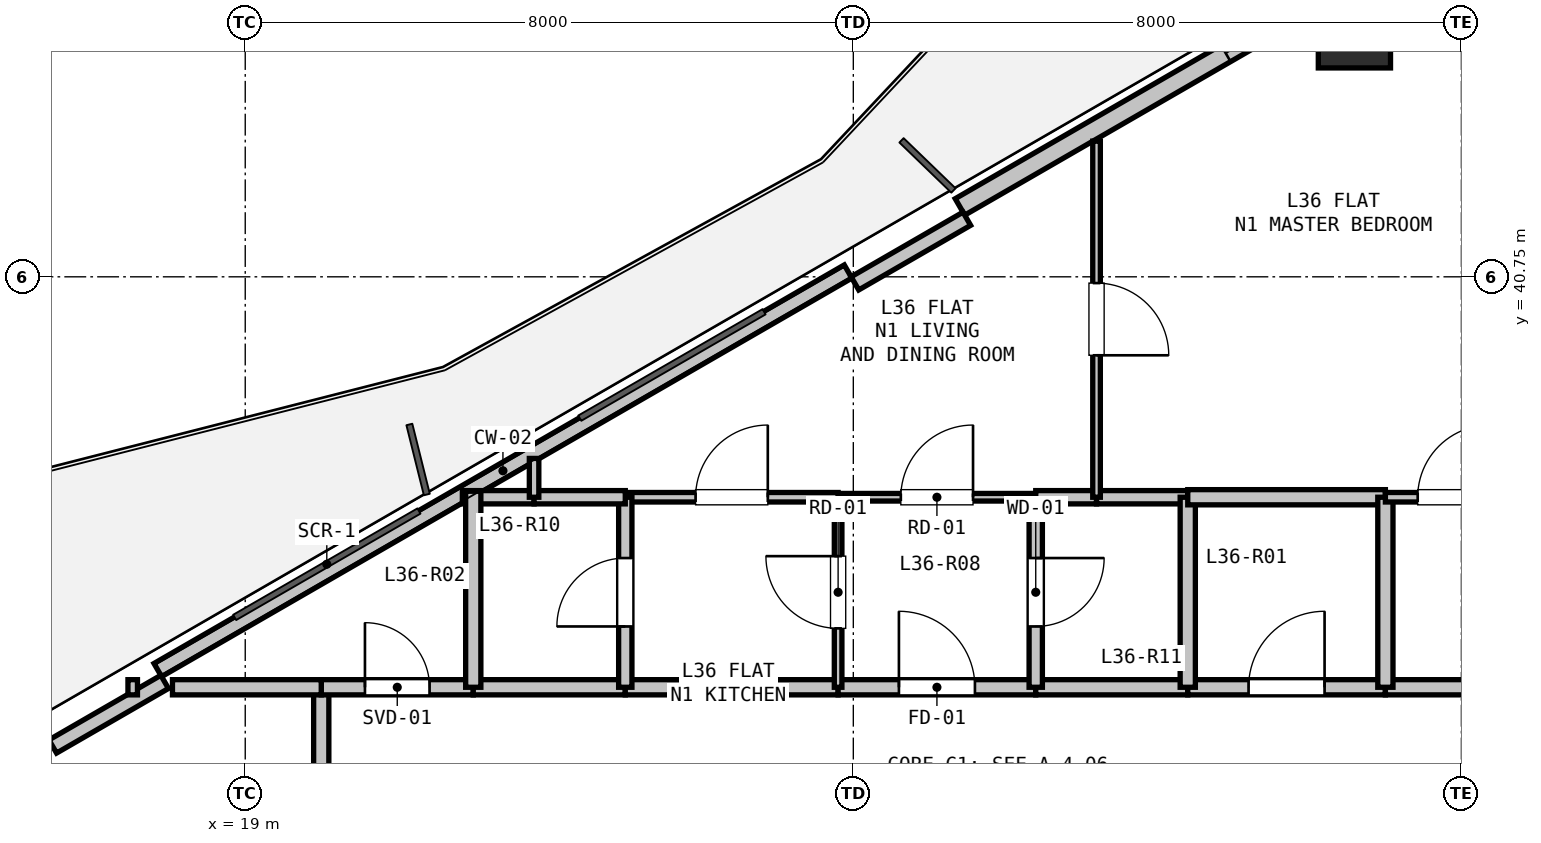
"""IFC4 building model, lengths in metres.
Left out: names, types, materials, properties, quantities, classifications, styles, units other than length and angle.
Written with IfcOpenShell. Run it as: python <this file> out.ifc"""

import sys

from ifc_helpers import new_model, si_unit, direction, frame, frame_2d, origin, origin_2d, place, context, subcontext, project, spatial, rectangle, hollow_rectangle, extrude, element, fill, save


model = new_model("IFC4")
c1 = context("Model", 3, precision=1e-05, world=origin(), true_north=direction((0.0, 1.0)))
c2 = subcontext(c1, "Body", "Model", "MODEL_VIEW")
j1 = project(units=[si_unit("LENGTHUNIT", "METRE"), si_unit("PLANEANGLEUNIT", "RADIAN")], contexts=[c1])
p1 = place(None, origin())
s1 = spatial("IfcSite", under=j1, at=p1, CompositionType="ELEMENT")
p2 = place(p1, origin())
s2 = spatial("IfcBuilding", under=s1, at=p2, CompositionType="ELEMENT")
p3 = place(p2, frame((0.0, 0.0, 131.1)))
s3 = spatial("IfcBuildingStorey", under=s2, at=p3, CompositionType="ELEMENT", Elevation=131.1)
p4 = place(p3, frame((33.593, 43.973, 0.0), z_axis=(0.0, 0.0, 1.0), x_axis=(1.0, 0.0, 0.0)))
e1 = element("IfcColumn", 1, at=p4, inside=s3, PredefinedType="COLUMN", context=c2, shape_type="SweptSolid", body=[
    extrude(hollow_rectangle(XDim=0.95, YDim=0.95, WallThickness=0.028, at=origin_2d()), origin(), (0.0, 0.0, 1.0), 3.3),
])
p5 = place(p3, frame((17.85, 35.577, 0.0), z_axis=(0.0, 0.0, 1.0), x_axis=(0.866026619769, 0.499997893847, 0.0)))
e2 = element("IfcWall", 2, at=p5, inside=s3, PredefinedType="PARAPET", context=c2, shape_type="SweptSolid", body=[
    extrude(rectangle(XDim=10.486, YDim=0.2, at=frame_2d((5.243, 0.0))), origin(), (0.0, 0.0, 1.0), 0.2),
])
p6 = place(p3, frame((28.403, 41.67, 0.0), z_axis=(0.0, 0.0, 1.0), x_axis=(0.86602239209, 0.500005216371, 0.0)))
e3 = element("IfcWall", 3, at=p6, inside=s3, PredefinedType="SOLIDWALL", context=c2, shape_type="SweptSolid", body=[
    extrude(rectangle(XDim=11.186, YDim=0.25, at=frame_2d((5.593, 0.0))), origin(), (0.0, 0.0, 1.0), 2.68),
])
p7 = place(p6, frame((4.039, 0.0, 0.9)))
e4 = element("IfcOpeningElement", 4, at=p7, cuts=e3, PredefinedType="OPENING", context=c2, shape_type="SweptSolid", body=[
    extrude(rectangle(XDim=1.2, YDim=1.4, at=frame_2d((0.6, 0.7))), frame((0.0, 0.135, 0.0), z_axis=(0.0, -1.0, 0.0), x_axis=(1.0, 0.0, 0.0)), (0.0, 0.0, 1.0), 0.27),
])
for number, where, z_axis, x_axis in (
    (5, (16.468, 34.571, 0.0), (0.0, 0.0, 1.0), (0.866, 0.5, 0.0)),
    (6, (27.021, 40.664, 0.0), (0.0, 0.0, 1.0), (0.866, 0.5, 0.0)),
):
    element("IfcWall", number, at=place(p3, frame(where, z_axis=z_axis, x_axis=x_axis)), inside=s3, PredefinedType="PARAPET", context=c2, shape_type="SweptSolid", body=[
        extrude(rectangle(XDim=1.7, YDim=0.2, at=frame_2d((0.85, 0.0))), origin(), (0.0, 0.0, 1.0), 2.68),
    ])
p8 = place(p3, frame((20.0, 32.75, 0.0), z_axis=(0.0, 0.0, 1.0), x_axis=(0.0, 1.0, 0.0)))
e7 = element("IfcWall", 7, at=p8, inside=s3, PredefinedType="PARTITIONING", context=c2, shape_type="SweptSolid", body=[
    extrude(rectangle(XDim=2.6, YDim=0.2, at=frame_2d((1.3, 0.0))), origin(), (0.0, 0.0, 1.0), 2.433),
])
p9 = place(p3, frame((20.0, 35.35, 0.0), z_axis=(0.0, 0.0, 1.0), x_axis=(1.0, 0.0, 0.0)))
e8 = element("IfcWall", 8, at=p9, inside=s3, PredefinedType="PARTITIONING", context=c2, shape_type="SweptSolid", body=[
    extrude(rectangle(XDim=2.0, YDim=0.2, at=frame_2d((1.0, 0.0))), origin(), (0.0, 0.0, 1.0), 3.06),
])
p10 = place(p9, frame((0.575, 0.0, 0.0)))
e9 = element("IfcOpeningElement", 9, at=p10, cuts=e8, PredefinedType="OPENING", context=c2, shape_type="SweptSolid", body=[
    extrude(rectangle(XDim=0.85, YDim=2.1, at=frame_2d((0.425, 1.05))), frame((0.0, 0.11, 0.0), z_axis=(0.0, -1.0, 0.0), x_axis=(1.0, 0.0, 0.0)), (0.0, 0.0, 1.0), 0.22),
])
p11 = place(p3, frame((22.0, 35.35, 0.0), z_axis=(0.0, 0.0, 1.0), x_axis=(1.0, 0.0, 0.0)))
e10 = element("IfcWall", 10, at=p11, inside=s3, PredefinedType="PARTITIONING", context=c2, shape_type="SweptSolid", body=[
    extrude(rectangle(XDim=2.0, YDim=0.2, at=frame_2d((1.0, 0.0))), origin(), (0.0, 0.0, 1.0), 3.06),
])
p12 = place(p3, frame((24.0, 35.35, 0.0), z_axis=(0.0, 0.0, 1.0), x_axis=(1.0, 0.0, 0.0)))
e11 = element("IfcWall", 11, at=p12, inside=s3, PredefinedType="PARTITIONING", context=c2, shape_type="SweptSolid", body=[
    extrude(rectangle(XDim=2.8, YDim=0.2, at=frame_2d((1.4, 0.0))), origin(), (0.0, 0.0, 1.0), 3.06),
])
p13 = place(p3, frame((26.8, 35.35, 0.0), z_axis=(0.0, 0.0, 1.0), x_axis=(1.0, 0.0, 0.0)))
e12 = element("IfcWall", 12, at=p13, inside=s3, PredefinedType="PARTITIONING", context=c2, shape_type="SweptSolid", body=[
    extrude(rectangle(XDim=2.6, YDim=0.2, at=frame_2d((1.3, 0.0))), origin(), (0.0, 0.0, 1.0), 3.06),
])
p14 = place(p13, frame((0.8, 0.0, 0.0)))
e13 = element("IfcOpeningElement", 13, at=p14, cuts=e12, PredefinedType="OPENING", context=c2, shape_type="SweptSolid", body=[
    extrude(rectangle(XDim=1.0, YDim=2.15, at=frame_2d((0.5, 1.075))), frame((0.0, 0.11, 0.0), z_axis=(0.0, -1.0, 0.0), x_axis=(1.0, 0.0, 0.0)), (0.0, 0.0, 1.0), 0.22),
])
p15 = place(p3, frame((29.4, 35.35, 0.0), z_axis=(0.0, 0.0, 1.0), x_axis=(1.0, 0.0, 0.0)))
e14 = element("IfcWall", 14, at=p15, inside=s3, PredefinedType="PARTITIONING", context=c2, shape_type="SweptSolid", body=[
    extrude(rectangle(XDim=2.0, YDim=0.2, at=frame_2d((1.0, 0.0))), origin(), (0.0, 0.0, 1.0), 3.06),
])
p16 = place(p3, frame((31.4, 35.35, 0.0), z_axis=(0.0, 0.0, 1.0), x_axis=(1.0, 0.0, 0.0)))
e15 = element("IfcWall", 15, at=p16, inside=s3, PredefinedType="PARTITIONING", context=c2, shape_type="SweptSolid", body=[
    extrude(rectangle(XDim=2.6, YDim=0.2, at=frame_2d((1.3, 0.0))), origin(), (0.0, 0.0, 1.0), 3.06),
])
p17 = place(p16, frame((0.8, 0.0, 0.0)))
e16 = element("IfcOpeningElement", 16, at=p17, cuts=e15, PredefinedType="OPENING", context=c2, shape_type="SweptSolid", body=[
    extrude(rectangle(XDim=1.0, YDim=2.15, at=frame_2d((0.5, 1.075))), frame((0.0, 0.11, 0.0), z_axis=(0.0, -1.0, 0.0), x_axis=(1.0, 0.0, 0.0)), (0.0, 0.0, 1.0), 0.22),
])
p18 = place(p3, frame((34.0, 35.35, 0.0), z_axis=(0.0, 0.0, 1.0), x_axis=(1.0, 0.0, 0.0)))
e17 = element("IfcWall", 17, at=p18, inside=s3, PredefinedType="PARTITIONING", context=c2, shape_type="SweptSolid", body=[
    extrude(rectangle(XDim=5.2, YDim=0.2, at=frame_2d((2.6, 0.0))), origin(), (0.0, 0.0, 1.0), 2.433),
])
p19 = place(p3, frame((26.8, 37.85, 0.0), z_axis=(0.0, 0.0, 1.0), x_axis=(1.0, 0.0, 0.0)))
e18 = element("IfcWall", 18, at=p19, inside=s3, PredefinedType="PARTITIONING", context=c2, shape_type="SweptSolid", body=[
    extrude(rectangle(XDim=2.6, YDim=0.1, at=frame_2d((1.3, 0.0))), origin(), (0.0, 0.0, 1.0), 3.06),
])
p20 = place(p19, frame((0.825, 0.0, 0.0)))
e19 = element("IfcOpeningElement", 19, at=p20, cuts=e18, PredefinedType="OPENING", context=c2, shape_type="SweptSolid", body=[
    extrude(rectangle(XDim=0.95, YDim=2.1, at=frame_2d((0.475, 1.05))), frame((0.0, 0.06, 0.0), z_axis=(0.0, -1.0, 0.0), x_axis=(1.0, 0.0, 0.0)), (0.0, 0.0, 1.0), 0.12),
])
p21 = place(p3, frame((29.4, 37.85, 0.0), z_axis=(0.0, 0.0, 1.0), x_axis=(0.0, -1.0, 0.0)))
e20 = element("IfcWall", 20, at=p21, inside=s3, PredefinedType="PLUMBINGWALL", context=c2, shape_type="SweptSolid", body=[
    extrude(rectangle(XDim=2.5, YDim=0.175, at=frame_2d((1.25, 0.0))), origin(), (0.0, 0.0, 1.0), 3.06),
])
p22 = place(p21, frame((0.8, 0.0, 0.0)))
e21 = element("IfcOpeningElement", 21, at=p22, cuts=e20, PredefinedType="OPENING", context=c2, shape_type="SweptSolid", body=[
    extrude(rectangle(XDim=0.9, YDim=2.1, at=frame_2d((0.45, 1.05))), frame((0.0, 0.097, 0.0), z_axis=(0.0, -1.0, 0.0), x_axis=(1.0, 0.0, 0.0)), (0.0, 0.0, 1.0), 0.195),
])
p23 = place(p3, frame((26.8, 35.35, 0.0), z_axis=(0.0, 0.0, 1.0), x_axis=(0.0, 1.0, 0.0)))
e22 = element("IfcWall", 22, at=p23, inside=s3, PredefinedType="PARTITIONING", context=c2, shape_type="SweptSolid", body=[
    extrude(rectangle(XDim=2.5, YDim=0.1, at=frame_2d((1.25, 0.0))), origin(), (0.0, 0.0, 1.0), 3.06),
])
p24 = place(p23, frame((0.775, 0.0, 0.0)))
e23 = element("IfcOpeningElement", 23, at=p24, cuts=e22, PredefinedType="OPENING", context=c2, shape_type="SweptSolid", body=[
    extrude(rectangle(XDim=0.95, YDim=2.1, at=frame_2d((0.475, 1.05))), frame((0.0, 0.06, 0.0), z_axis=(0.0, -1.0, 0.0), x_axis=(1.0, 0.0, 0.0)), (0.0, 0.0, 1.0), 0.12),
])
p25 = place(p3, frame((24.0, 37.85, 0.0), z_axis=(0.0, 0.0, 1.0), x_axis=(1.0, 0.0, 0.0)))
e24 = element("IfcWall", 24, at=p25, inside=s3, PredefinedType="PARTITIONING", context=c2, shape_type="SweptSolid", body=[
    extrude(rectangle(XDim=2.8, YDim=0.125, at=frame_2d((1.4, 0.0))), origin(), (0.0, 0.0, 1.0), 3.06),
])
p26 = place(p25, frame((0.925, 0.0, 0.0)))
e25 = element("IfcOpeningElement", 25, at=p26, cuts=e24, PredefinedType="OPENING", context=c2, shape_type="SweptSolid", body=[
    extrude(rectangle(XDim=0.95, YDim=2.1, at=frame_2d((0.475, 1.05))), frame((0.0, 0.073, 0.0), z_axis=(0.0, -1.0, 0.0), x_axis=(1.0, 0.0, 0.0)), (0.0, 0.0, 1.0), 0.145),
])
p27 = place(p3, frame((24.0, 35.35, 0.0), z_axis=(0.0, 0.0, 1.0), x_axis=(0.0, 1.0, 0.0)))
e26 = element("IfcWall", 26, at=p27, inside=s3, PredefinedType="PLUMBINGWALL", context=c2, shape_type="SweptSolid", body=[
    extrude(rectangle(XDim=2.5, YDim=0.175, at=frame_2d((1.25, 0.0))), origin(), (0.0, 0.0, 1.0), 3.06),
])
p28 = place(p27, frame((0.8, 0.0, 0.0)))
e27 = element("IfcOpeningElement", 27, at=p28, cuts=e26, PredefinedType="OPENING", context=c2, shape_type="SweptSolid", body=[
    extrude(rectangle(XDim=0.9, YDim=2.1, at=frame_2d((0.45, 1.05))), frame((0.0, 0.097, 0.0), z_axis=(0.0, -1.0, 0.0), x_axis=(1.0, 0.0, 0.0)), (0.0, 0.0, 1.0), 0.195),
])
p29 = place(p3, frame((21.856, 37.85, 0.0), z_axis=(0.0, 0.0, 1.0), x_axis=(1.0, 0.0, 0.0)))
e28 = element("IfcWall", 28, at=p29, inside=s3, PredefinedType="PLUMBINGWALL", context=c2, shape_type="SweptSolid", body=[
    extrude(rectangle(XDim=0.944, YDim=0.175, at=frame_2d((0.472, 0.0))), origin(), (0.0, 0.0, 1.0), 2.365),
])
p30 = place(p3, frame((22.8, 37.85, 0.0), z_axis=(0.0, 0.0, 1.0), x_axis=(1.0, 0.0, 0.0)))
e29 = element("IfcWall", 29, at=p30, inside=s3, PredefinedType="PLUMBINGWALL", context=c2, shape_type="SweptSolid", body=[
    extrude(rectangle(XDim=1.2, YDim=0.175, at=frame_2d((0.6, 0.0))), origin(), (0.0, 0.0, 1.0), 2.365),
])
p31 = place(p3, frame((22.0, 35.35, 0.0), z_axis=(0.0, 0.0, 1.0), x_axis=(0.0, 1.0, 0.0)))
e30 = element("IfcWall", 30, at=p31, inside=s3, PredefinedType="PARTITIONING", context=c2, shape_type="SweptSolid", body=[
    extrude(rectangle(XDim=2.579, YDim=0.2, at=frame_2d((1.29, 0.0))), origin(), (0.0, 0.0, 1.0), 2.365),
])
p32 = place(p3, frame((29.4, 37.85, 0.0), z_axis=(0.0, 0.0, 1.0), x_axis=(1.0, 0.0, 0.0)))
e31 = element("IfcWall", 31, at=p32, inside=s3, PredefinedType="PLUMBINGWALL", context=c2, shape_type="SweptSolid", body=[
    extrude(rectangle(XDim=0.8, YDim=0.175, at=frame_2d((0.4, 0.0))), origin(), (0.0, 0.0, 1.0), 3.06),
])
p33 = place(p3, frame((30.2, 37.85, 0.0), z_axis=(0.0, 0.0, 1.0), x_axis=(1.0, 0.0, 0.0)))
e32 = element("IfcWall", 32, at=p33, inside=s3, PredefinedType="PLUMBINGWALL", context=c2, shape_type="SweptSolid", body=[
    extrude(rectangle(XDim=1.2, YDim=0.175, at=frame_2d((0.6, 0.0))), origin(), (0.0, 0.0, 1.0), 3.06),
])
p34 = place(p3, frame((31.4, 37.85, 0.0), z_axis=(0.0, 0.0, 1.0), x_axis=(0.0, -1.0, 0.0)))
e33 = element("IfcWall", 33, at=p34, inside=s3, PredefinedType="PARTITIONING", context=c2, shape_type="SweptSolid", body=[
    extrude(rectangle(XDim=2.5, YDim=0.2, at=frame_2d((1.25, 0.0))), origin(), (0.0, 0.0, 1.0), 3.06),
])
p35 = place(p3, frame((31.4, 37.85, 0.0), z_axis=(0.0, 0.0, 1.0), x_axis=(1.0, 0.0, 0.0)))
e34 = element("IfcWall", 34, at=p35, inside=s3, PredefinedType="PARTITIONING", context=c2, shape_type="SweptSolid", body=[
    extrude(rectangle(XDim=2.6, YDim=0.2, at=frame_2d((1.3, 0.0))), origin(), (0.0, 0.0, 1.0), 3.06),
])
p36 = place(p3, frame((34.0, 37.85, 0.0), z_axis=(0.0, 0.0, 1.0), x_axis=(0.0, -1.0, 0.0)))
e35 = element("IfcWall", 35, at=p36, inside=s3, PredefinedType="PARTITIONING", context=c2, shape_type="SweptSolid", body=[
    extrude(rectangle(XDim=2.5, YDim=0.2, at=frame_2d((1.25, 0.0))), origin(), (0.0, 0.0, 1.0), 3.06),
])
p37 = place(p3, frame((20.0, 35.35, 0.0), z_axis=(0.0, 0.0, 1.0), x_axis=(-1.0, 0.0, 0.0)))
e36 = element("IfcWall", 36, at=p37, inside=s3, PredefinedType="PARTITIONING", context=c2, shape_type="SweptSolid", body=[
    extrude(rectangle(XDim=1.958, YDim=0.2, at=frame_2d((0.979, 0.0))), origin(), (0.0, 0.0, 1.0), 2.365),
])
p38 = place(p3, frame((17.582, 35.35, 0.0), z_axis=(0.0, 0.0, 1.0), x_axis=(-1.0, 0.0, 0.0)))
e37 = element("IfcWall", 37, at=p38, inside=s3, PredefinedType="PARTITIONING", context=c2, shape_type="SweptSolid", body=[
    extrude(rectangle(XDim=0.125, YDim=0.2, at=frame_2d((0.062, 0.0))), origin(), (0.0, 0.0, 1.0), 3.06),
])
p39 = place(p3, frame((34.0, 37.85, 0.0), z_axis=(0.0, 0.0, 1.0), x_axis=(1.0, 0.0, 0.0)))
e38 = element("IfcWall", 38, at=p39, inside=s3, PredefinedType="PARTITIONING", context=c2, shape_type="SweptSolid", body=[
    extrude(rectangle(XDim=1.8, YDim=0.125, at=frame_2d((0.9, 0.0))), origin(), (0.0, 0.0, 1.0), 3.06),
])
p40 = place(p39, frame((0.425, 0.0, 0.0)))
e39 = element("IfcOpeningElement", 39, at=p40, cuts=e38, PredefinedType="OPENING", context=c2, shape_type="SweptSolid", body=[
    extrude(rectangle(XDim=0.95, YDim=2.1, at=frame_2d((0.475, 1.05))), frame((0.0, 0.073, 0.0), z_axis=(0.0, -1.0, 0.0), x_axis=(1.0, 0.0, 0.0)), (0.0, 0.0, 1.0), 0.145),
])
p41 = place(p3, frame((22.8, 37.85, 0.0), z_axis=(0.0, 0.0, 1.0), x_axis=(0.0, 1.0, 0.0)))
e40 = element("IfcWall", 40, at=p41, inside=s3, PredefinedType="PARTITIONING", context=c2, shape_type="SweptSolid", body=[
    extrude(rectangle(XDim=0.51, YDim=0.125, at=frame_2d((0.255, 0.0))), origin(), (0.0, 0.0, 1.0), 2.724),
])
p42 = place(p3, frame((30.2, 42.535, 0.0), z_axis=(0.0, 0.0, 1.0), x_axis=(0.0, -1.0, 0.0)))
e41 = element("IfcWall", 41, at=p42, inside=s3, PredefinedType="PARTITIONING", context=c2, shape_type="SweptSolid", body=[
    extrude(rectangle(XDim=4.685, YDim=0.1, at=frame_2d((2.342, 0.0))), origin(), (0.0, 0.0, 1.0), 2.365),
])
p43 = place(p42, frame((1.867, 0.0, 0.0)))
e42 = element("IfcOpeningElement", 42, at=p43, cuts=e41, PredefinedType="OPENING", context=c2, shape_type="SweptSolid", body=[
    extrude(rectangle(XDim=0.95, YDim=2.1, at=frame_2d((0.475, 1.05))), frame((0.0, 0.06, 0.0), z_axis=(0.0, -1.0, 0.0), x_axis=(1.0, 0.0, 0.0)), (0.0, 0.0, 1.0), 0.12),
])
p44 = place(p7, origin())
e43 = element("IfcWindow", 43, at=p44, inside=s3, PartitioningType="SINGLE_PANEL", PredefinedType="WINDOW", context=c2, shape_type="SweptSolid", body=[
    extrude(rectangle(XDim=1.2, YDim=1.4, at=frame_2d((0.6, 0.7))), frame((0.0, 0.03, 0.0), z_axis=(0.0, -1.0, 0.0), x_axis=(1.0, 0.0, 0.0)), (0.0, 0.0, 1.0), 0.06),
])
fill(e4, e43)
p45 = place(p14, origin())
e44 = element("IfcDoor", 44, at=p45, inside=s3, OperationType="SINGLE_SWING_LEFT", PredefinedType="DOOR", context=c2, shape_type="SweptSolid", body=[
    extrude(rectangle(XDim=1.0, YDim=2.15, at=frame_2d((0.5, 1.075))), frame((0.0, 0.025, 0.0), z_axis=(0.0, -1.0, 0.0), x_axis=(1.0, 0.0, 0.0)), (0.0, 0.0, 1.0), 0.05),
])
fill(e13, e44)
p46 = place(p17, origin())
e45 = element("IfcDoor", 45, at=p46, inside=s3, OperationType="SINGLE_SWING_RIGHT", PredefinedType="DOOR", context=c2, shape_type="SweptSolid", body=[
    extrude(rectangle(XDim=1.0, YDim=2.15, at=frame_2d((0.5, 1.075))), frame((0.0, 0.025, 0.0), z_axis=(0.0, -1.0, 0.0), x_axis=(1.0, 0.0, 0.0)), (0.0, 0.0, 1.0), 0.05),
])
fill(e16, e45)
p47 = place(p10, origin())
e46 = element("IfcDoor", 46, at=p47, inside=s3, OperationType="SINGLE_SWING_LEFT", PredefinedType="DOOR", context=c2, shape_type="SweptSolid", body=[
    extrude(rectangle(XDim=0.85, YDim=2.1, at=frame_2d((0.425, 1.05))), frame((0.0, 0.025, 0.0), z_axis=(0.0, -1.0, 0.0), x_axis=(1.0, 0.0, 0.0)), (0.0, 0.0, 1.0), 0.05),
])
fill(e9, e46)
p48 = place(p24, origin())
e47 = element("IfcDoor", 47, at=p48, inside=s3, OperationType="SINGLE_SWING_RIGHT", PredefinedType="DOOR", context=c2, shape_type="SweptSolid", body=[
    extrude(rectangle(XDim=0.95, YDim=2.1, at=frame_2d((0.475, 1.05))), frame((0.0, 0.025, 0.0), z_axis=(0.0, -1.0, 0.0), x_axis=(1.0, 0.0, 0.0)), (0.0, 0.0, 1.0), 0.05),
])
fill(e23, e47)
p49 = place(p22, origin())
e48 = element("IfcDoor", 48, at=p49, inside=s3, OperationType="SINGLE_SWING_LEFT", PredefinedType="DOOR", context=c2, shape_type="SweptSolid", body=[
    extrude(rectangle(XDim=0.9, YDim=2.1, at=frame_2d((0.45, 1.05))), frame((0.0, 0.025, 0.0), z_axis=(0.0, -1.0, 0.0), x_axis=(1.0, 0.0, 0.0)), (0.0, 0.0, 1.0), 0.05),
])
fill(e21, e48)
p50 = place(p20, origin())
e49 = element("IfcDoor", 49, at=p50, inside=s3, OperationType="SINGLE_SWING_RIGHT", PredefinedType="DOOR", context=c2, shape_type="SweptSolid", body=[
    extrude(rectangle(XDim=0.95, YDim=2.1, at=frame_2d((0.475, 1.05))), frame((0.0, 0.025, 0.0), z_axis=(0.0, -1.0, 0.0), x_axis=(1.0, 0.0, 0.0)), (0.0, 0.0, 1.0), 0.05),
])
fill(e19, e49)
p51 = place(p26, origin())
e50 = element("IfcDoor", 50, at=p51, inside=s3, OperationType="SINGLE_SWING_RIGHT", PredefinedType="DOOR", context=c2, shape_type="SweptSolid", body=[
    extrude(rectangle(XDim=0.95, YDim=2.1, at=frame_2d((0.475, 1.05))), frame((0.0, 0.025, 0.0), z_axis=(0.0, -1.0, 0.0), x_axis=(1.0, 0.0, 0.0)), (0.0, 0.0, 1.0), 0.05),
])
fill(e25, e50)
p52 = place(p40, origin())
e51 = element("IfcDoor", 51, at=p52, inside=s3, OperationType="SINGLE_SWING_RIGHT", PredefinedType="DOOR", context=c2, shape_type="SweptSolid", body=[
    extrude(rectangle(XDim=0.95, YDim=2.1, at=frame_2d((0.475, 1.05))), frame((0.0, 0.025, 0.0), z_axis=(0.0, -1.0, 0.0), x_axis=(1.0, 0.0, 0.0)), (0.0, 0.0, 1.0), 0.05),
])
fill(e39, e51)
p53 = place(p43, origin())
e52 = element("IfcDoor", 52, at=p53, inside=s3, OperationType="SINGLE_SWING_RIGHT", PredefinedType="DOOR", context=c2, shape_type="SweptSolid", body=[
    extrude(rectangle(XDim=0.95, YDim=2.1, at=frame_2d((0.475, 1.05))), frame((0.0, 0.025, 0.0), z_axis=(0.0, -1.0, 0.0), x_axis=(1.0, 0.0, 0.0)), (0.0, 0.0, 1.0), 0.05),
])
fill(e42, e52)
p54 = place(p28, origin())
e53 = element("IfcDoor", 53, at=p54, inside=s3, OperationType="SINGLE_SWING_LEFT", PredefinedType="DOOR", context=c2, shape_type="SweptSolid", body=[
    extrude(rectangle(XDim=0.9, YDim=2.1, at=frame_2d((0.45, 1.05))), frame((0.0, 0.025, 0.0), z_axis=(0.0, -1.0, 0.0), x_axis=(1.0, 0.0, 0.0)), (0.0, 0.0, 1.0), 0.05),
])
fill(e27, e53)
save(model, sys.argv[1])
